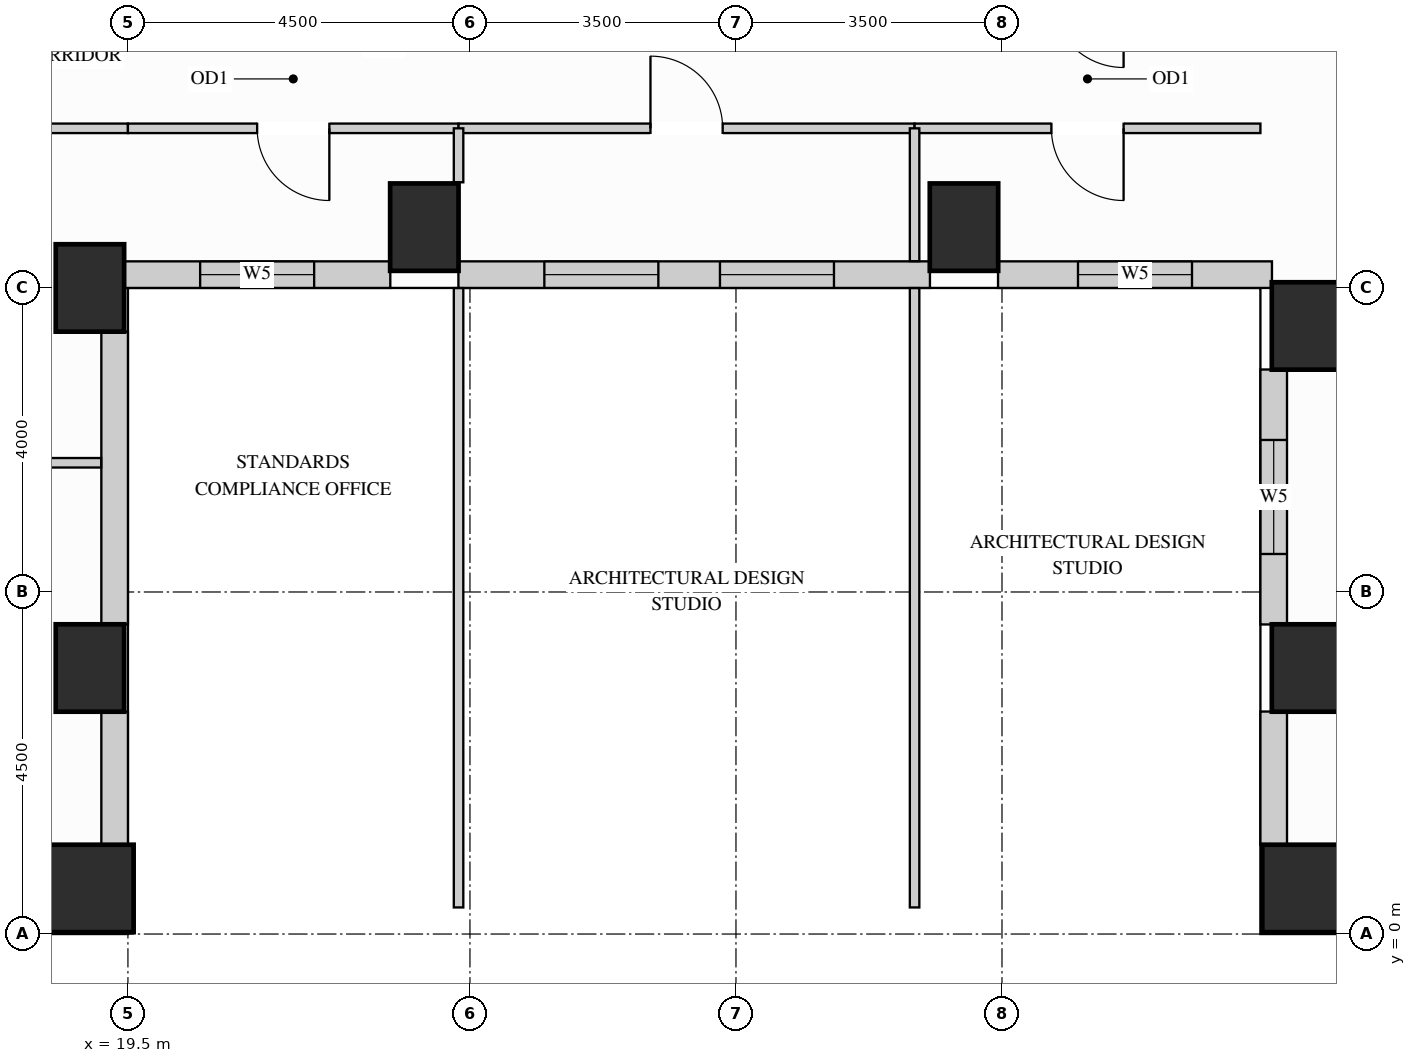
"""IFC4 building model, lengths in metres.
Left out: names, types, materials, properties, quantities, classifications, styles, units other than length and angle.
Written with IfcOpenShell. Run it as: python <this file> out.ifc"""

import sys

from ifc_helpers import new_model, si_unit, direction, frame, frame_2d, origin, origin_2d, place, context, subcontext, project, spatial, rectangle, extrude, source, transform, mapped, element, fill, save


model = new_model("IFC4")
c1 = context("Model", 3, precision=1e-05, world=origin(), true_north=direction((0.0, 1.0)))
c2 = subcontext(c1, "Body", "Model", "MODEL_VIEW")
j1 = project(units=[si_unit("LENGTHUNIT", "METRE"), si_unit("PLANEANGLEUNIT", "RADIAN")], contexts=[c1])
p1 = place(None, origin())
s1 = spatial("IfcSite", under=j1, at=p1, CompositionType="ELEMENT")
p2 = place(p1, origin())
s2 = spatial("IfcBuilding", under=s1, at=p2, CompositionType="ELEMENT")
p3 = place(p2, frame((0.0, 0.0, 109.8)))
s3 = spatial("IfcBuildingStorey", under=s2, at=p3, CompositionType="ELEMENT", Elevation=109.8)
m1 = source(origin(), c2, "Body", "SweptSolid", [
    extrude(rectangle(XDim=0.9, YDim=1.15, at=origin_2d()), origin(), (0.0, 0.0, 1.0), 3.38),
])
for number, where, z_axis, x_axis in (
    (1, (19.0, 3.5, 0.0), (0.0, 0.0, 1.0), (1.0, 0.0, 0.0)),
    (2, (19.0, 8.5, 0.0), (0.0, 0.0, 1.0), (1.0, 0.0, 0.0)),
    (3, (35.0, 3.5, 0.0), (0.0, 0.0, 1.0), (1.0, 0.0, 0.0)),
    (4, (35.0, 8.0, 0.0), (0.0, 0.0, 1.0), (1.0, 0.0, 0.0)),
    (5, (23.4, 9.3, 0.0), (0.0, 0.0, 1.0), (1.0, 0.0, 0.0)),
    (6, (30.5, 9.3, 0.0), (0.0, 0.0, 1.0), (1.0, 0.0, 0.0)),
):
    element("IfcColumn", number, at=place(p3, frame(where, z_axis=z_axis, x_axis=x_axis)), inside=s3, PredefinedType="COLUMN", context=c2, shape_type="MappedRepresentation", body=[
        mapped(m1, transform((0.0, 0.0, 0.0), x_axis=(1.0, 0.0, 0.0), y_axis=(0.0, 1.0, 0.0), z_axis=(0.0, 0.0, 1.0))),
    ])
m2 = source(origin(), c2, "Body", "SweptSolid", [
    extrude(rectangle(XDim=1.15, YDim=1.15, at=origin_2d()), origin(), (0.0, 0.0, 1.0), 3.38),
])
for number, where, z_axis, x_axis in (
    (7, (19.0, 0.6, 0.0), (0.0, 0.0, 1.0), (1.0, 0.0, 0.0)),
    (8, (35.0, 0.6, 0.0), (0.0, 0.0, 1.0), (1.0, 0.0, 0.0)),
):
    element("IfcColumn", number, at=place(p3, frame(where, z_axis=z_axis, x_axis=x_axis)), inside=s3, PredefinedType="COLUMN", context=c2, shape_type="MappedRepresentation", body=[
        mapped(m2, transform((0.0, 0.0, 0.0), x_axis=(1.0, 0.0, 0.0), y_axis=(0.0, 1.0, 0.0), z_axis=(0.0, 0.0, 1.0))),
    ])
m3 = source(origin(), c2, "Body", "SweptSolid", [
    extrude(rectangle(XDim=1.754, YDim=0.35, at=frame_2d((0.877, 0.0))), origin(), (0.0, 0.0, 1.0), 2.519),
])
p4 = place(p3, frame((19.325, 1.173, 0.0), z_axis=(0.0, 0.0, 1.0), x_axis=(0.0, 1.0, 0.0)))
e9 = element("IfcWall", 9, at=p4, inside=s3, PredefinedType="SOLIDWALL", context=c2, shape_type="MappedRepresentation", body=[
    mapped(m3, transform((0.0, 0.0, 0.0), x_axis=(1.0, 0.0, 0.0), y_axis=(0.0, 1.0, 0.0), z_axis=(0.0, 0.0, 1.0))),
])
m4 = source(origin(), c2, "Body", "SweptSolid", [
    extrude(rectangle(XDim=3.854, YDim=0.35, at=frame_2d((1.927, 0.0))), origin(), (0.0, 0.0, 1.0), 2.519),
])
p5 = place(p3, frame((19.325, 4.073, 0.0), z_axis=(0.0, 0.0, 1.0), x_axis=(0.0, 1.0, 0.0)))
e10 = element("IfcWall", 10, at=p5, inside=s3, PredefinedType="SOLIDWALL", context=c2, shape_type="MappedRepresentation", body=[
    mapped(m4, transform((0.0, 0.0, 0.0), x_axis=(1.0, 0.0, 0.0), y_axis=(0.0, 1.0, 0.0), z_axis=(0.0, 0.0, 1.0))),
])
p6 = place(p3, frame((19.448, 8.675, 0.0), z_axis=(0.0, 0.0, 1.0), x_axis=(1.0, 0.0, 0.0)))
e11 = element("IfcWall", 11, at=p6, inside=s3, PredefinedType="SOLIDWALL", context=c2, shape_type="SweptSolid", body=[
    extrude(rectangle(XDim=3.504, YDim=0.35, at=frame_2d((1.752, 0.0))), origin(), (0.0, 0.0, 1.0), 3.365),
])
p7 = place(p6, frame((1.002, 0.0, 0.78)))
e12 = element("IfcOpeningElement", 12, at=p7, cuts=e11, PredefinedType="OPENING", context=c2, shape_type="SweptSolid", body=[
    extrude(rectangle(XDim=1.5, YDim=2.0, at=frame_2d((0.75, 1.0))), frame((0.0, 0.185, 0.0), z_axis=(0.0, -1.0, 0.0), x_axis=(1.0, 0.0, 0.0)), (0.0, 0.0, 1.0), 0.37),
])
p8 = place(p3, frame((23.848, 8.675, 0.0), z_axis=(0.0, 0.0, 1.0), x_axis=(1.0, 0.0, 0.0)))
e13 = element("IfcWall", 13, at=p8, inside=s3, PredefinedType="SOLIDWALL", context=c2, shape_type="SweptSolid", body=[
    extrude(rectangle(XDim=6.204, YDim=0.35, at=frame_2d((3.102, 0.0))), origin(), (0.0, 0.0, 1.0), 3.365),
])
p9 = place(p8, frame((1.131, 0.0, 0.78)))
e14 = element("IfcOpeningElement", 14, at=p9, cuts=e13, PredefinedType="OPENING", context=c2, shape_type="SweptSolid", body=[
    extrude(rectangle(XDim=1.5, YDim=2.0, at=frame_2d((0.75, 1.0))), frame((0.0, 0.185, 0.0), z_axis=(0.0, -1.0, 0.0), x_axis=(1.0, 0.0, 0.0)), (0.0, 0.0, 1.0), 0.37),
])
p10 = place(p8, frame((3.441, 0.0, 0.78)))
e15 = element("IfcOpeningElement", 15, at=p10, cuts=e13, PredefinedType="OPENING", context=c2, shape_type="SweptSolid", body=[
    extrude(rectangle(XDim=1.5, YDim=2.0, at=frame_2d((0.75, 1.0))), frame((0.0, 0.185, 0.0), z_axis=(0.0, -1.0, 0.0), x_axis=(1.0, 0.0, 0.0)), (0.0, 0.0, 1.0), 0.37),
])
p11 = place(p3, frame((30.948, 8.675, 0.0), z_axis=(0.0, 0.0, 1.0), x_axis=(1.0, 0.0, 0.0)))
e16 = element("IfcWall", 16, at=p11, inside=s3, PredefinedType="SOLIDWALL", context=c2, shape_type="SweptSolid", body=[
    extrude(rectangle(XDim=3.604, YDim=0.35, at=frame_2d((1.802, 0.0))), origin(), (0.0, 0.0, 1.0), 3.365),
])
p12 = place(p11, frame((1.052, 0.0, 0.78)))
e17 = element("IfcOpeningElement", 17, at=p12, cuts=e16, PredefinedType="OPENING", context=c2, shape_type="SweptSolid", body=[
    extrude(rectangle(XDim=1.5, YDim=2.0, at=frame_2d((0.75, 1.0))), frame((0.0, 0.185, 0.0), z_axis=(0.0, -1.0, 0.0), x_axis=(1.0, 0.0, 0.0)), (0.0, 0.0, 1.0), 0.37),
])
p13 = place(p3, frame((34.575, 7.427, 0.0), z_axis=(0.0, 0.0, 1.0), x_axis=(0.0, -1.0, 0.0)))
e18 = element("IfcWall", 18, at=p13, inside=s3, PredefinedType="SOLIDWALL", context=c2, shape_type="SweptSolid", body=[
    extrude(rectangle(XDim=3.354, YDim=0.35, at=frame_2d((1.677, 0.0))), origin(), (0.0, 0.0, 1.0), 3.365),
])
p14 = place(p13, frame((0.927, 0.0, 0.78)))
e19 = element("IfcOpeningElement", 19, at=p14, cuts=e18, PredefinedType="OPENING", context=c2, shape_type="SweptSolid", body=[
    extrude(rectangle(XDim=1.5, YDim=2.0, at=frame_2d((0.75, 1.0))), frame((0.0, 0.185, 0.0), z_axis=(0.0, -1.0, 0.0), x_axis=(1.0, 0.0, 0.0)), (0.0, 0.0, 1.0), 0.37),
])
m5 = source(origin(), c2, "Body", "SweptSolid", [
    extrude(rectangle(XDim=1.754, YDim=0.35, at=frame_2d((0.877, 0.0))), origin(), (0.0, 0.0, 1.0), 3.365),
])
p15 = place(p3, frame((34.575, 2.927, 0.0), z_axis=(0.0, 0.0, 1.0), x_axis=(0.0, -1.0, 0.0)))
e20 = element("IfcWall", 20, at=p15, inside=s3, PredefinedType="SOLIDWALL", context=c2, shape_type="MappedRepresentation", body=[
    mapped(m5, transform((0.0, 0.0, 0.0), x_axis=(1.0, 0.0, 0.0), y_axis=(0.0, 1.0, 0.0), z_axis=(0.0, 0.0, 1.0))),
])
m6 = source(origin(), c2, "Body", "SweptSolid", [
    extrude(rectangle(XDim=2.95, YDim=0.125, at=frame_2d((1.475, 0.0))), origin(), (0.0, 0.0, 1.0), 3.365),
])
p16 = place(p3, frame((16.55, 10.6, 0.0), z_axis=(0.0, 0.0, 1.0), x_axis=(1.0, 0.0, 0.0)))
e21 = element("IfcWall", 21, at=p16, inside=s3, PredefinedType="PARTITIONING", context=c2, shape_type="MappedRepresentation", body=[
    mapped(m6, transform((0.0, 0.0, 0.0), x_axis=(1.0, 0.0, 0.0), y_axis=(0.0, 1.0, 0.0), z_axis=(0.0, 0.0, 1.0))),
])
p17 = place(p3, frame((19.5, 10.6, 0.0), z_axis=(0.0, 0.0, 1.0), x_axis=(1.0, 0.0, 0.0)))
e22 = element("IfcWall", 22, at=p17, inside=s3, PredefinedType="PARTITIONING", context=c2, shape_type="SweptSolid", body=[
    extrude(rectangle(XDim=4.35, YDim=0.125, at=frame_2d((2.175, 0.0))), origin(), (0.0, 0.0, 1.0), 3.365),
])
p18 = place(p17, frame((1.7, 0.0, 0.0)))
e23 = element("IfcOpeningElement", 23, at=p18, cuts=e22, PredefinedType="OPENING", context=c2, shape_type="SweptSolid", body=[
    extrude(rectangle(XDim=0.95, YDim=2.15, at=frame_2d((0.475, 1.075))), frame((0.0, 0.073, 0.0), z_axis=(0.0, -1.0, 0.0), x_axis=(1.0, 0.0, 0.0)), (0.0, 0.0, 1.0), 0.145),
])
p19 = place(p3, frame((23.85, 10.6, 0.0), z_axis=(0.0, 0.0, 1.0), x_axis=(1.0, 0.0, 0.0)))
e24 = element("IfcWall", 24, at=p19, inside=s3, PredefinedType="PARTITIONING", context=c2, shape_type="SweptSolid", body=[
    extrude(rectangle(XDim=6.0, YDim=0.125, at=frame_2d((3.0, 0.0))), origin(), (0.0, 0.0, 1.0), 3.365),
])
p20 = place(p19, frame((2.525, 0.0, 0.0)))
e25 = element("IfcOpeningElement", 25, at=p20, cuts=e24, PredefinedType="OPENING", context=c2, shape_type="SweptSolid", body=[
    extrude(rectangle(XDim=0.95, YDim=2.15, at=frame_2d((0.475, 1.075))), frame((0.0, 0.073, 0.0), z_axis=(0.0, -1.0, 0.0), x_axis=(1.0, 0.0, 0.0)), (0.0, 0.0, 1.0), 0.145),
])
p21 = place(p3, frame((29.85, 10.6, 0.0), z_axis=(0.0, 0.0, 1.0), x_axis=(1.0, 0.0, 0.0)))
e26 = element("IfcWall", 26, at=p21, inside=s3, PredefinedType="PARTITIONING", context=c2, shape_type="SweptSolid", body=[
    extrude(rectangle(XDim=4.55, YDim=0.125, at=frame_2d((2.275, 0.0))), origin(), (0.0, 0.0, 1.0), 3.365),
])
p22 = place(p21, frame((1.8, 0.0, 0.0)))
e27 = element("IfcOpeningElement", 27, at=p22, cuts=e26, PredefinedType="OPENING", context=c2, shape_type="SweptSolid", body=[
    extrude(rectangle(XDim=0.95, YDim=2.15, at=frame_2d((0.475, 1.075))), frame((0.0, 0.073, 0.0), z_axis=(0.0, -1.0, 0.0), x_axis=(1.0, 0.0, 0.0)), (0.0, 0.0, 1.0), 0.145),
])
m7 = source(origin(), c2, "Body", "SweptSolid", [
    extrude(rectangle(XDim=8.148, YDim=0.125, at=frame_2d((4.074, 0.0))), origin(), (0.0, 0.0, 1.0), 3.365),
])
p23 = place(p3, frame((23.85, 0.35, 0.0), z_axis=(0.0, 0.0, 1.0), x_axis=(0.0, 1.0, 0.0)))
e28 = element("IfcWall", 28, at=p23, inside=s3, PredefinedType="PARTITIONING", context=c2, shape_type="MappedRepresentation", body=[
    mapped(m7, transform((0.0, 0.0, 0.0), x_axis=(1.0, 0.0, 0.0), y_axis=(0.0, 1.0, 0.0), z_axis=(0.0, 0.0, 1.0))),
])
m8 = source(origin(), c2, "Body", "SweptSolid", [
    extrude(rectangle(XDim=0.71, YDim=0.125, at=frame_2d((0.355, 0.0))), origin(), (0.0, 0.0, 1.0), 3.365),
])
p24 = place(p3, frame((23.85, 9.89, 0.0), z_axis=(0.0, 0.0, 1.0), x_axis=(0.0, 1.0, 0.0)))
e29 = element("IfcWall", 29, at=p24, inside=s3, PredefinedType="PARTITIONING", context=c2, shape_type="MappedRepresentation", body=[
    mapped(m8, transform((0.0, 0.0, 0.0), x_axis=(1.0, 0.0, 0.0), y_axis=(0.0, 1.0, 0.0), z_axis=(0.0, 0.0, 1.0))),
])
p25 = place(p3, frame((29.85, 0.35, 0.0), z_axis=(0.0, 0.0, 1.0), x_axis=(0.0, 1.0, 0.0)))
e30 = element("IfcWall", 30, at=p25, inside=s3, PredefinedType="PARTITIONING", context=c2, shape_type="MappedRepresentation", body=[
    mapped(m7, transform((0.0, 0.0, 0.0), x_axis=(1.0, 0.0, 0.0), y_axis=(0.0, 1.0, 0.0), z_axis=(0.0, 0.0, 1.0))),
])
m9 = source(origin(), c2, "Body", "SweptSolid", [
    extrude(rectangle(XDim=1.748, YDim=0.125, at=frame_2d((0.874, 0.0))), origin(), (0.0, 0.0, 1.0), 3.365),
])
p26 = place(p3, frame((29.85, 8.852, 0.0), z_axis=(0.0, 0.0, 1.0), x_axis=(0.0, 1.0, 0.0)))
e31 = element("IfcWall", 31, at=p26, inside=s3, PredefinedType="PARTITIONING", context=c2, shape_type="MappedRepresentation", body=[
    mapped(m9, transform((0.0, 0.0, 0.0), x_axis=(1.0, 0.0, 0.0), y_axis=(0.0, 1.0, 0.0), z_axis=(0.0, 0.0, 1.0))),
])
m10 = source(origin(), c2, "Body", "SweptSolid", [
    extrude(rectangle(XDim=2.598, YDim=0.125, at=frame_2d((1.299, 0.0))), origin(), (0.0, 0.0, 1.0), 2.828),
])
p27 = place(p3, frame((16.55, 6.2, 0.0), z_axis=(0.0, 0.0, 1.0), x_axis=(1.0, 0.0, 0.0)))
e32 = element("IfcWall", 32, at=p27, inside=s3, PredefinedType="PARTITIONING", context=c2, shape_type="MappedRepresentation", body=[
    mapped(m10, transform((0.0, 0.0, 0.0), x_axis=(1.0, 0.0, 0.0), y_axis=(0.0, 1.0, 0.0), z_axis=(0.0, 0.0, 1.0))),
])
m11 = source(origin(), c2, "Body", "SweptSolid", [
    extrude(rectangle(XDim=0.95, YDim=2.15, at=frame_2d((0.475, 1.075))), frame((0.0, 0.025, 0.0), z_axis=(0.0, -1.0, 0.0), x_axis=(1.0, 0.0, 0.0)), (0.0, 0.0, 1.0), 0.05),
])
p28 = place(p18, origin())
e33 = element("IfcDoor", 33, at=p28, inside=s3, OperationType="SINGLE_SWING_RIGHT", PredefinedType="DOOR", context=c2, shape_type="MappedRepresentation", body=[
    mapped(m11, transform((0.0, 0.0, 0.0), x_axis=(1.0, 0.0, 0.0), y_axis=(0.0, 1.0, 0.0), z_axis=(0.0, 0.0, 1.0))),
])
fill(e23, e33)
p29 = place(p20, origin())
e34 = element("IfcDoor", 34, at=p29, inside=s3, OperationType="SINGLE_SWING_LEFT", PredefinedType="DOOR", context=c2, shape_type="MappedRepresentation", body=[
    mapped(m11, transform((0.0, 0.0, 0.0), x_axis=(1.0, 0.0, 0.0), y_axis=(0.0, 1.0, 0.0), z_axis=(0.0, 0.0, 1.0))),
])
fill(e25, e34)
p30 = place(p22, origin())
e35 = element("IfcDoor", 35, at=p30, inside=s3, OperationType="SINGLE_SWING_RIGHT", PredefinedType="DOOR", context=c2, shape_type="MappedRepresentation", body=[
    mapped(m11, transform((0.0, 0.0, 0.0), x_axis=(1.0, 0.0, 0.0), y_axis=(0.0, 1.0, 0.0), z_axis=(0.0, 0.0, 1.0))),
])
fill(e27, e35)
m12 = source(origin(), c2, "Body", "SweptSolid", [
    extrude(rectangle(XDim=1.5, YDim=2.0, at=frame_2d((0.75, 1.0))), frame((0.0, 0.03, 0.0), z_axis=(0.0, -1.0, 0.0), x_axis=(1.0, 0.0, 0.0)), (0.0, 0.0, 1.0), 0.06),
])
p31 = place(p7, origin())
e36 = element("IfcWindow", 36, at=p31, inside=s3, PartitioningType="SINGLE_PANEL", PredefinedType="WINDOW", context=c2, shape_type="MappedRepresentation", body=[
    mapped(m12, transform((0.0, 0.0, 0.0), x_axis=(1.0, 0.0, 0.0), y_axis=(0.0, 1.0, 0.0), z_axis=(0.0, 0.0, 1.0))),
])
fill(e12, e36)
p32 = place(p9, origin())
e37 = element("IfcWindow", 37, at=p32, inside=s3, PartitioningType="SINGLE_PANEL", PredefinedType="WINDOW", context=c2, shape_type="MappedRepresentation", body=[
    mapped(m12, transform((0.0, 0.0, 0.0), x_axis=(1.0, 0.0, 0.0), y_axis=(0.0, 1.0, 0.0), z_axis=(0.0, 0.0, 1.0))),
])
fill(e14, e37)
p33 = place(p10, origin())
e38 = element("IfcWindow", 38, at=p33, inside=s3, PartitioningType="SINGLE_PANEL", PredefinedType="WINDOW", context=c2, shape_type="MappedRepresentation", body=[
    mapped(m12, transform((0.0, 0.0, 0.0), x_axis=(1.0, 0.0, 0.0), y_axis=(0.0, 1.0, 0.0), z_axis=(0.0, 0.0, 1.0))),
])
fill(e15, e38)
p34 = place(p12, origin())
e39 = element("IfcWindow", 39, at=p34, inside=s3, PartitioningType="SINGLE_PANEL", PredefinedType="WINDOW", context=c2, shape_type="MappedRepresentation", body=[
    mapped(m12, transform((0.0, 0.0, 0.0), x_axis=(1.0, 0.0, 0.0), y_axis=(0.0, 1.0, 0.0), z_axis=(0.0, 0.0, 1.0))),
])
fill(e17, e39)
p35 = place(p14, origin())
e40 = element("IfcWindow", 40, at=p35, inside=s3, PartitioningType="SINGLE_PANEL", PredefinedType="WINDOW", context=c2, shape_type="MappedRepresentation", body=[
    mapped(m12, transform((0.0, 0.0, 0.0), x_axis=(1.0, 0.0, 0.0), y_axis=(0.0, 1.0, 0.0), z_axis=(0.0, 0.0, 1.0))),
])
fill(e19, e40)
save(model, sys.argv[1])
